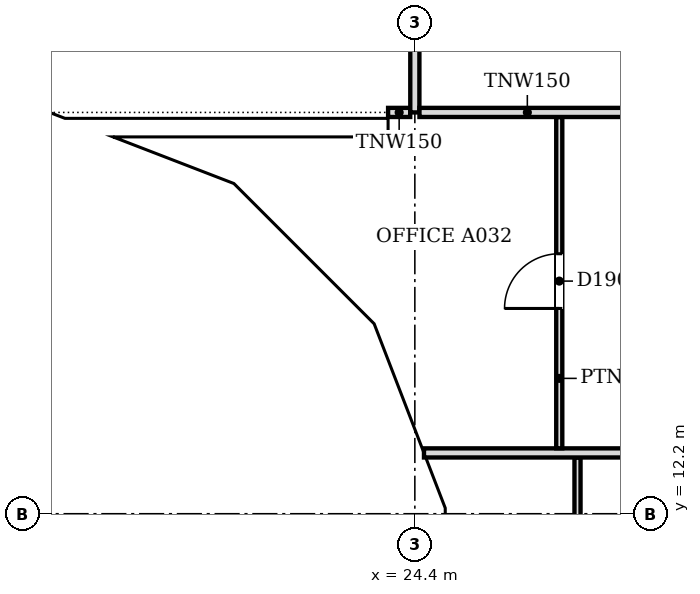
"""IFC4 building model, lengths in metres.
Left out: names, types, materials, properties, quantities, classifications, styles, units other than length and angle.
Written with IfcOpenShell. Run it as: python <this file> out.ifc"""

import sys

from ifc_helpers import new_model, si_unit, direction, frame, frame_2d, origin, place, context, subcontext, project, spatial, polyline, rectangle, outline, extrude, faceted_brep, source, transform, mapped, element, fill, save


model = new_model("IFC4")
c1 = context("Model", 3, precision=1e-05, world=origin(), true_north=direction((0.0, 1.0)))
c2 = subcontext(c1, "Body", "Model", "MODEL_VIEW")
j1 = project(units=[si_unit("LENGTHUNIT", "METRE"), si_unit("PLANEANGLEUNIT", "RADIAN")], contexts=[c1])
p1 = place(None, origin())
s1 = spatial("IfcSite", under=j1, at=p1, CompositionType="ELEMENT")
p2 = place(p1, origin())
s2 = spatial("IfcBuilding", under=s1, at=p2, CompositionType="ELEMENT")
p3 = place(p2, frame((0.0, 0.0, 16.8)))
s3 = spatial("IfcBuildingStorey", under=s2, at=p3, CompositionType="ELEMENT", Elevation=16.8)
m1 = source(origin(), c2, "Body", "Brep", [
    faceted_brep([(3.143, -0.25, 0.075), (0.093, -0.25, 4.434), (0.093, -0.25, 0.0), (3.143, -0.25, 0.0), (0.0, 0.25, 4.432), (0.047, 0.25, 4.5), (3.196, 0.25, 0.0), (0.0, 0.25, 0.0), (0.047, 0.0, 4.5), (3.196, -0.0, 0.0)], [[[0, 1, 2, 3]], [[4, 5, 6, 7]], [[6, 5, 8, 1, 0, 9]], [[5, 4, 8]], [[7, 6, 9, 3, 2]], [[7, 2, 1, 8, 4]], [[3, 9, 0]]]),
])
p4 = place(p3, frame((18.303, 18.567, 0.0), z_axis=(0.0, 0.0, 1.0), x_axis=(0.932978940178, -0.359930961693, 0.0)))
e1 = element("IfcWall", 1, at=p4, inside=s3, PredefinedType="SOLIDWALL", context=c2, shape_type="MappedRepresentation", body=[
    mapped(m1, transform((0.0, 0.0, 0.0), scale=1.0)),
])
m2 = source(origin(), c2, "Body", "SweptSolid", [
    extrude(outline(polyline([(2.716, 0.25), (0.247, 3.778), (0.247, 0.25), (2.716, 0.25)])), frame((0.0, 0.26, 0.0), z_axis=(0.0, -1.0, 0.0), x_axis=(1.0, 0.0, 0.0)), (0.0, 0.0, 1.0), 0.52),
])
p5 = place(p4, origin())
e2 = element("IfcOpeningElement", 2, at=p5, cuts=e1, PredefinedType="OPENING", context=c2, shape_type="MappedRepresentation", body=[
    mapped(m2, transform((0.0, 0.0, 0.0), scale=1.0)),
])
m3 = source(origin(), c2, "Body", "Brep", [
    faceted_brep([(3.103, -0.25, 4.425), (0.053, -0.25, 0.075), (0.053, -0.25, 0.0), (3.103, -0.25, 0.0), (0.0, 0.25, 0.0), (3.156, 0.25, 4.5), (3.209, 0.25, 4.424), (3.209, 0.25, 0.0), (3.156, -0.0, 4.5), (0.0, 0.0, 0.0)], [[[0, 1, 2, 3]], [[4, 5, 6, 7]], [[6, 5, 8]], [[5, 4, 9, 1, 0, 8]], [[4, 7, 3, 2, 9]], [[9, 2, 1]], [[3, 7, 6, 8, 0]]]),
])
p6 = place(p3, frame((21.285, 17.417, 0.0), z_axis=(0.0, 0.0, 1.0), x_axis=(0.707106781187, -0.707106781187, 0.0)))
e3 = element("IfcWall", 3, at=p6, inside=s3, PredefinedType="SOLIDWALL", context=c2, shape_type="MappedRepresentation", body=[
    mapped(m3, transform((0.0, 0.0, 0.0), scale=1.0)),
])
m4 = source(origin(), c2, "Body", "SweptSolid", [
    extrude(outline(polyline([(2.956, 3.779), (0.481, 0.25), (2.956, 0.25), (2.956, 3.779)])), frame((0.0, 0.26, 0.0), z_axis=(0.0, -1.0, 0.0), x_axis=(1.0, 0.0, 0.0)), (0.0, 0.0, 1.0), 0.52),
])
p7 = place(p6, origin())
e4 = element("IfcOpeningElement", 4, at=p7, cuts=e3, PredefinedType="OPENING", context=c2, shape_type="MappedRepresentation", body=[
    mapped(m4, transform((0.0, 0.0, 0.0), scale=1.0)),
])
m5 = source(origin(), c2, "Body", "Brep", [
    faceted_brep([(3.156, -0.25, 0.066), (0.106, -0.25, 4.424), (0.106, -0.25, 0.0), (3.156, -0.25, 0.0), (0.0, 0.25, 4.425), (0.053, 0.25, 4.5), (3.202, 0.25, 0.0), (0.0, 0.25, 0.0), (0.053, 0.0, 4.5), (3.202, -0.0, 0.0)], [[[0, 1, 2, 3]], [[4, 5, 6, 7]], [[6, 5, 8, 1, 0, 9]], [[5, 4, 8]], [[7, 6, 9, 3, 2]], [[7, 2, 1, 8, 4]], [[3, 9, 0]]]),
])
p8 = place(p3, frame((23.497, 15.234, 0.0), z_axis=(0.0, 0.0, 1.0), x_axis=(0.359913782069, -0.932985567668, 0.0)))
e5 = element("IfcWall", 5, at=p8, inside=s3, PredefinedType="SOLIDWALL", context=c2, shape_type="MappedRepresentation", body=[
    mapped(m5, transform((0.0, 0.0, 0.0), scale=1.0)),
])
m6 = source(origin(), c2, "Body", "SweptSolid", [
    extrude(outline(polyline([(2.722, 0.25), (0.253, 3.778), (0.253, 0.25), (2.722, 0.25)])), frame((0.0, 0.26, 0.0), z_axis=(0.0, -1.0, 0.0), x_axis=(1.0, 0.0, 0.0)), (0.0, 0.0, 1.0), 0.52),
])
p9 = place(p8, origin())
e6 = element("IfcOpeningElement", 6, at=p9, cuts=e5, PredefinedType="OPENING", context=c2, shape_type="MappedRepresentation", body=[
    mapped(m6, transform((0.0, 0.0, 0.0), scale=1.0)),
])
m7 = source(origin(), c2, "Body", "Brep", [
    faceted_brep([(6.1, -0.25, 0.0), (3.096, -0.25, 4.5), (0.047, -0.25, 0.068), (0.047, -0.25, 0.0), (0.0, 0.25, 0.0), (3.096, 0.25, 4.5), (6.053, 0.25, 0.07), (6.053, 0.25, 0.0), (6.1, -0.0, 0.0), (0.0, 0.0, 0.0)], [[[0, 1, 2, 3]], [[4, 5, 6, 7]], [[6, 5, 1, 0, 8]], [[5, 4, 9, 2, 1]], [[4, 7, 8, 0, 3, 9]], [[9, 3, 2]], [[8, 7, 6]]]),
])
p10 = place(p3, frame((24.65, 12.247, 0.0), z_axis=(0.0, 0.0, 1.0), x_axis=(0.0, -1.0, 0.0)))
e7 = element("IfcWall", 7, at=p10, inside=s3, PredefinedType="SOLIDWALL", context=c2, shape_type="MappedRepresentation", body=[
    mapped(m7, transform((0.0, 0.0, 0.0), scale=1.0)),
])
m8 = source(origin(), c2, "Body", "SweptSolid", [
    extrude(outline(polyline([(5.633, 0.25), (3.094, 4.054), (0.476, 0.25), (5.633, 0.25)])), frame((0.0, 0.26, 0.0), z_axis=(0.0, -1.0, 0.0), x_axis=(1.0, 0.0, 0.0)), (0.0, 0.0, 1.0), 0.52),
])
p11 = place(p10, origin())
e8 = element("IfcOpeningElement", 8, at=p11, cuts=e7, PredefinedType="OPENING", context=c2, shape_type="MappedRepresentation", body=[
    mapped(m8, transform((0.0, 0.0, 0.0), scale=1.0)),
])
p12 = place(p2, frame((0.0, 0.0, 21.3)))
s4 = spatial("IfcBuildingStorey", under=s2, at=p12, CompositionType="ELEMENT", Elevation=21.3)
m9 = source(origin(), c2, "Body", "Brep", [
    faceted_brep([(3.096, -0.25, 8.925), (0.047, -0.25, 4.566), (0.047, -0.25, 4.434), (3.096, -0.25, 0.075), (0.0, 0.25, 4.5), (3.149, 0.25, 9.0), (3.202, 0.25, 8.925), (3.202, 0.25, 0.075), (3.149, 0.25, 0.0), (3.149, -0.0, 0.0), (3.149, -0.0, 9.0), (0.0, 0.0, 4.5)], [[[0, 1, 2, 3]], [[4, 5, 6, 7, 8]], [[8, 7, 9]], [[6, 5, 10]], [[5, 4, 11, 1, 0, 10]], [[4, 8, 9, 3, 2, 11]], [[11, 2, 1]], [[3, 9, 7, 6, 10, 0]]]),
])
p13 = place(p12, frame((18.346, 18.55, -4.5), z_axis=(0.0, 0.0, 1.0), x_axis=(0.932985567668, -0.359913782069, 0.0)))
e9 = element("IfcWall", 9, at=p13, inside=s4, PredefinedType="SOLIDWALL", context=c2, shape_type="MappedRepresentation", body=[
    mapped(m9, transform((0.0, 0.0, 0.0), scale=1.0)),
])
m10 = source(origin(), c2, "Body", "SweptSolid", [
    extrude(outline(polyline([(2.949, 8.278), (0.305, 4.5), (2.949, 0.722), (2.949, 8.278)])), frame((0.0, 0.26, 0.0), z_axis=(0.0, -1.0, 0.0), x_axis=(1.0, 0.0, 0.0)), (0.0, 0.0, 1.0), 0.52),
])
p14 = place(p13, origin())
e10 = element("IfcOpeningElement", 10, at=p14, cuts=e9, PredefinedType="OPENING", context=c2, shape_type="MappedRepresentation", body=[
    mapped(m10, transform((0.0, 0.0, 0.0), scale=1.0)),
])
m11 = source(origin(), c2, "Body", "Brep", [
    faceted_brep([(0.106, -0.25, 0.075), (3.156, -0.25, 4.425), (3.156, -0.25, 4.575), (0.106, -0.25, 8.925), (0.0, 0.25, 8.924), (0.053, 0.25, 9.0), (3.209, 0.25, 4.5), (0.053, 0.25, 0.0), (0.0, 0.25, 0.076), (3.209, -0.0, 4.5), (0.053, 0.0, 0.0), (0.053, 0.0, 9.0)], [[[0, 1, 2, 3]], [[4, 5, 6, 7, 8]], [[7, 6, 9, 1, 0, 10]], [[6, 5, 11, 3, 2, 9]], [[5, 4, 11]], [[8, 7, 10]], [[8, 10, 0, 3, 11, 4]], [[1, 9, 2]]]),
])
p15 = place(p12, frame((21.248, 17.454, -4.5), z_axis=(0.0, 0.0, 1.0), x_axis=(0.707106781187, -0.707106781187, 0.0)))
e11 = element("IfcWall", 11, at=p15, inside=s4, PredefinedType="SOLIDWALL", context=c2, shape_type="MappedRepresentation", body=[
    mapped(m11, transform((0.0, 0.0, 0.0), scale=1.0)),
])
m12 = source(origin(), c2, "Body", "SweptSolid", [
    extrude(outline(polyline([(0.253, 0.72), (2.904, 4.5), (0.253, 8.279), (0.253, 0.72)])), frame((0.0, 0.26, 0.0), z_axis=(0.0, -1.0, 0.0), x_axis=(1.0, 0.0, 0.0)), (0.0, 0.0, 1.0), 0.52),
])
p16 = place(p15, origin())
e12 = element("IfcOpeningElement", 12, at=p16, cuts=e11, PredefinedType="OPENING", context=c2, shape_type="MappedRepresentation", body=[
    mapped(m12, transform((0.0, 0.0, 0.0), scale=1.0)),
])
m13 = source(origin(), c2, "Body", "Brep", [
    faceted_brep([(3.103, -0.25, 8.934), (0.053, -0.25, 4.576), (0.053, -0.25, 4.424), (3.103, -0.25, 0.066), (0.0, 0.25, 4.5), (3.149, 0.25, 9.0), (3.196, 0.25, 8.932), (3.196, 0.25, 0.068), (3.149, 0.25, 0.0), (3.149, -0.0, 0.0), (3.149, -0.0, 9.0), (0.0, 0.0, 4.5)], [[[0, 1, 2, 3]], [[4, 5, 6, 7, 8]], [[8, 7, 9]], [[6, 5, 10]], [[5, 4, 11, 1, 0, 10]], [[4, 8, 9, 3, 2, 11]], [[11, 2, 1]], [[3, 9, 7, 6, 10, 0]]]),
])
p17 = place(p12, frame((23.517, 15.185, -4.5), z_axis=(0.0, 0.0, 1.0), x_axis=(0.359864468756, -0.933004589553, 0.0)))
e13 = element("IfcWall", 13, at=p17, inside=s4, PredefinedType="SOLIDWALL", context=c2, shape_type="MappedRepresentation", body=[
    mapped(m13, transform((0.0, 0.0, 0.0), scale=1.0)),
])
p18 = place(p17, origin())
e14 = element("IfcOpeningElement", 14, at=p18, cuts=e13, PredefinedType="OPENING", context=c2, shape_type="MappedRepresentation", body=[
    mapped(m10, transform((0.0, 0.0, 0.0), scale=1.0)),
])
m14 = source(origin(), c2, "Body", "Brep", [
    faceted_brep([(0.093, -0.25, 0.068), (3.143, -0.25, 4.5), (0.093, -0.25, 8.932), (0.0, 0.25, 8.934), (0.047, 0.25, 9.0), (3.143, 0.25, 4.5), (0.047, 0.25, 0.0), (0.0, 0.25, 0.066), (0.047, 0.0, 0.0), (0.047, 0.0, 9.0)], [[[0, 1, 2]], [[3, 4, 5, 6, 7]], [[6, 5, 1, 0, 8]], [[5, 4, 9, 2, 1]], [[4, 3, 9]], [[7, 6, 8]], [[7, 8, 0, 2, 9, 3]]]),
])
p19 = place(p12, frame((24.65, 12.293, -4.5), z_axis=(0.0, 0.0, 1.0), x_axis=(0.0, -1.0, 0.0)))
e15 = element("IfcWall", 15, at=p19, inside=s4, PredefinedType="SOLIDWALL", context=c2, shape_type="MappedRepresentation", body=[
    mapped(m14, transform((0.0, 0.0, 0.0), scale=1.0)),
])
m15 = source(origin(), c2, "Body", "SweptSolid", [
    extrude(outline(polyline([(0.247, 0.732), (2.84, 4.5), (0.247, 8.268), (0.247, 0.732)])), frame((0.0, 0.26, 0.0), z_axis=(0.0, -1.0, 0.0), x_axis=(1.0, 0.0, 0.0)), (0.0, 0.0, 1.0), 0.52),
])
p20 = place(p19, origin())
e16 = element("IfcOpeningElement", 16, at=p20, cuts=e15, PredefinedType="OPENING", context=c2, shape_type="MappedRepresentation", body=[
    mapped(m15, transform((0.0, 0.0, 0.0), scale=1.0)),
])
p21 = place(p3, frame((27.075, 4.2, 0.0), z_axis=(0.0, 0.0, 1.0), x_axis=(0.0, 1.0, 0.0)))
e17 = element("IfcWall", 17, at=p21, inside=s3, PredefinedType="PARTITIONING", context=c2, shape_type="SweptSolid", body=[
    extrude(rectangle(XDim=8.924, YDim=0.1, at=frame_2d((4.462, 0.0))), origin(), (0.0, 0.0, 1.0), 3.415),
])
m16 = source(origin(), c2, "Body", "SweptSolid", [
    extrude(rectangle(XDim=0.9, YDim=2.1, at=frame_2d((0.45, 1.05))), frame((0.0, 0.06, 0.0), z_axis=(0.0, -1.0, 0.0), x_axis=(1.0, 0.0, 0.0)), (0.0, 0.0, 1.0), 0.12),
])
p22 = place(p21, frame((6.148, 0.0, 0.0)))
e18 = element("IfcOpeningElement", 18, at=p22, cuts=e17, PredefinedType="OPENING", context=c2, shape_type="MappedRepresentation", body=[
    mapped(m16, transform((0.0, 0.0, 0.0), scale=1.0)),
])
p23 = place(p21, frame((1.7, 0.0, 0.0)))
e19 = element("IfcOpeningElement", 19, at=p23, cuts=e17, PredefinedType="OPENING", context=c2, shape_type="MappedRepresentation", body=[
    mapped(m16, transform((0.0, 0.0, 0.0), scale=1.0)),
])
p24 = place(p3, frame((24.55, 13.2, 0.0), z_axis=(0.0, 0.0, 1.0), x_axis=(1.0, 0.0, 0.0)))
e20 = element("IfcWall", 20, at=p24, inside=s3, PredefinedType="PARTITIONING", context=c2, shape_type="SweptSolid", body=[
    extrude(rectangle(XDim=19.374, YDim=0.15, at=frame_2d((9.687, 0.0))), origin(), (0.0, 0.0, 1.0), 3.415),
])
p25 = place(p3, frame((26.775, 13.276, 0.0), z_axis=(0.0, 0.0, 1.0), x_axis=(0.0, 1.0, 0.0)))
e21 = element("IfcWall", 21, at=p25, inside=s3, PredefinedType="PARTITIONING", context=c2, shape_type="SweptSolid", body=[
    extrude(rectangle(XDim=5.448, YDim=0.1, at=frame_2d((2.724, 0.0))), origin(), (0.0, 0.0, 1.0), 3.415),
])
p26 = place(p25, frame((2.3, 0.0, 0.0)))
e22 = element("IfcOpeningElement", 22, at=p26, cuts=e21, PredefinedType="OPENING", context=c2, shape_type="MappedRepresentation", body=[
    mapped(m16, transform((0.0, 0.0, 0.0), scale=1.0)),
])
p27 = place(p3, frame((23.96, 18.8, 0.0), z_axis=(0.0, 0.0, 1.0), x_axis=(1.0, 0.0, 0.0)))
e23 = element("IfcWall", 23, at=p27, inside=s3, PredefinedType="PARTITIONING", context=c2, shape_type="SweptSolid", body=[
    extrude(rectangle(XDim=0.364, YDim=0.15, at=frame_2d((0.182, 0.0))), origin(), (0.0, 0.0, 1.0), 3.415),
])
p28 = place(p3, frame((24.4, 18.8, 0.0), z_axis=(0.0, 0.0, 1.0), x_axis=(0.0, 1.0, 0.0)))
e24 = element("IfcWall", 24, at=p28, inside=s3, PredefinedType="PARTITIONING", context=c2, shape_type="SweptSolid", body=[
    extrude(rectangle(XDim=5.049, YDim=0.15, at=frame_2d((2.524, 0.0))), origin(), (0.0, 0.0, 1.0), 3.415),
])
p29 = place(p3, frame((24.476, 18.8, 0.0), z_axis=(0.0, 0.0, 1.0), x_axis=(1.0, 0.0, 0.0)))
e25 = element("IfcWall", 25, at=p29, inside=s3, PredefinedType="PARTITIONING", context=c2, shape_type="SweptSolid", body=[
    extrude(rectangle(XDim=3.548, YDim=0.15, at=frame_2d((1.774, 0.0))), origin(), (0.0, 0.0, 1.0), 3.415),
])
m17 = source(origin(), c2, "Body", "SweptSolid", [
    extrude(rectangle(XDim=0.9, YDim=2.1, at=frame_2d((0.45, 1.05))), frame((0.0, 0.025, 0.0), z_axis=(0.0, -1.0, 0.0), x_axis=(1.0, 0.0, 0.0)), (0.0, 0.0, 1.0), 0.05),
])
p30 = place(p26, origin())
e26 = element("IfcDoor", 26, at=p30, inside=s3, OperationType="SINGLE_SWING_LEFT", PredefinedType="DOOR", context=c2, shape_type="MappedRepresentation", body=[
    mapped(m17, transform((0.0, 0.0, 0.0), scale=1.0)),
])
fill(e22, e26)
save(model, sys.argv[1])
